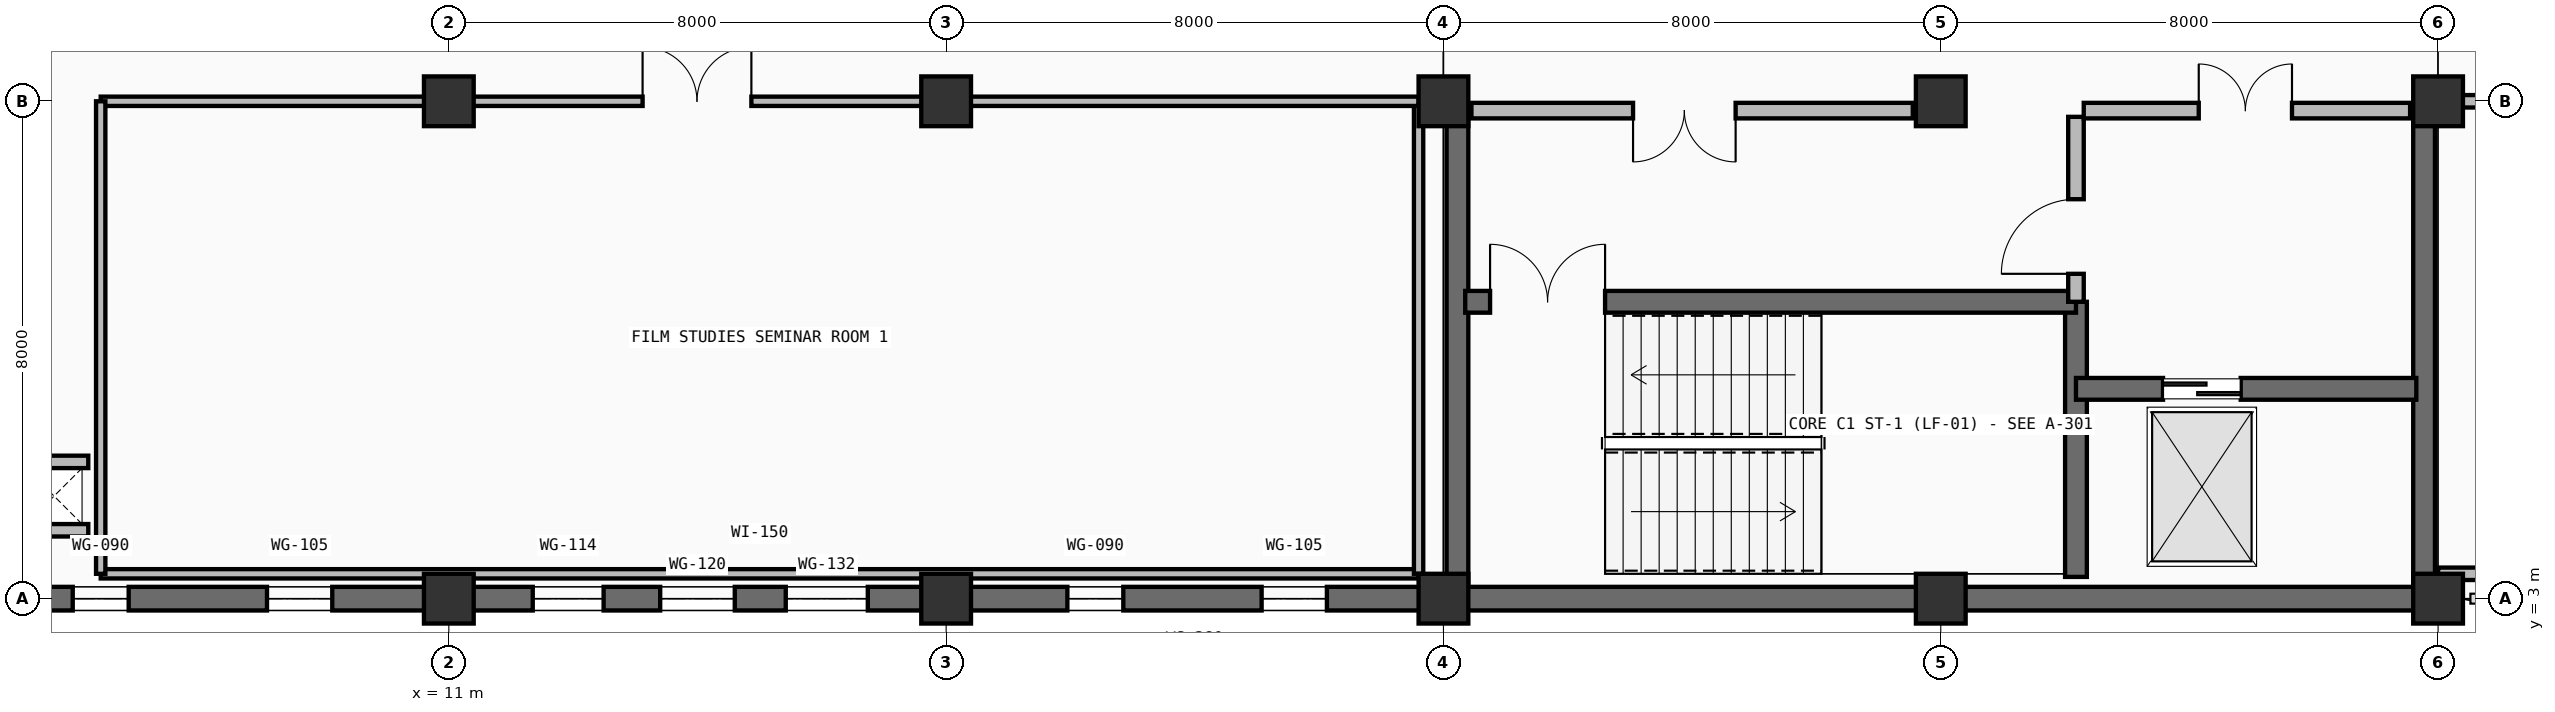
"""IFC4 building model, lengths in metres.
Left out: names, types, materials, properties, quantities, classifications, styles, units other than length and angle.
Written with IfcOpenShell. Run it as: python <this file> out.ifc"""

import sys

from ifc_helpers import new_model, si_unit, direction, frame, frame_2d, origin, origin_2d, place, context, subcontext, project, spatial, rectangle, extrude, element, fill, save


model = new_model("IFC4")
c1 = context("Model", 3, precision=1e-05, world=origin(), true_north=direction((0.0, 1.0)))
c2 = subcontext(c1, "Body", "Model", "MODEL_VIEW")
j1 = project(units=[si_unit("LENGTHUNIT", "METRE"), si_unit("PLANEANGLEUNIT", "RADIAN")], contexts=[c1])
p1 = place(None, origin())
s1 = spatial("IfcSite", under=j1, at=p1, CompositionType="ELEMENT")
p2 = place(p1, origin())
s2 = spatial("IfcBuilding", under=s1, at=p2, CompositionType="ELEMENT")
p3 = place(p2, frame((0.0, 0.0, 14.4)))
s3 = spatial("IfcBuildingStorey", under=s2, at=p3, CompositionType="ELEMENT", Elevation=14.4)
for number, where, z_axis, x_axis in (
    (1, (11.0, 3.0, 0.0), (0.0, 0.0, 1.0), (1.0, 0.0, 0.0)),
    (2, (11.0, 11.0, 0.0), (0.0, 0.0, 1.0), (1.0, 0.0, 0.0)),
    (3, (19.0, 3.0, 0.0), (0.0, 0.0, 1.0), (1.0, 0.0, 0.0)),
    (4, (19.0, 11.0, 0.0), (0.0, 0.0, 1.0), (1.0, 0.0, 0.0)),
    (5, (27.0, 3.0, 0.0), (0.0, 0.0, 1.0), (1.0, 0.0, 0.0)),
    (6, (27.0, 11.0, 0.0), (0.0, 0.0, 1.0), (1.0, 0.0, 0.0)),
    (7, (35.0, 3.0, 0.0), (0.0, 0.0, 1.0), (1.0, 0.0, 0.0)),
    (8, (35.0, 11.0, 0.0), (0.0, 0.0, 1.0), (1.0, 0.0, 0.0)),
    (9, (43.0, 3.0, 0.0), (0.0, 0.0, 1.0), (1.0, 0.0, 0.0)),
    (10, (43.0, 11.0, 0.0), (0.0, 0.0, 1.0), (1.0, 0.0, 0.0)),
):
    element("IfcColumn", number, at=place(p3, frame(where, z_axis=z_axis, x_axis=x_axis)), inside=s3, PredefinedType="COLUMN", context=c2, shape_type="SweptSolid", body=[
        extrude(rectangle(XDim=0.8, YDim=0.8, at=origin_2d()), origin(), (0.0, 0.0, 1.0), 4.5),
    ])
for number, where, z_axis, x_axis in (
    (11, (43.0, 3.0, 0.0), (0.0, 0.0, 1.0), (-1.0, 0.0, 0.0)),
    (12, (35.0, 3.0, 0.0), (0.0, 0.0, 1.0), (-1.0, 0.0, 0.0)),
):
    element("IfcWall", number, at=place(p3, frame(where, z_axis=z_axis, x_axis=x_axis)), inside=s3, PredefinedType="SOLIDWALL", context=c2, shape_type="SweptSolid", body=[
        extrude(rectangle(XDim=8.0, YDim=0.38, at=frame_2d((4.0, 0.0))), origin(), (0.0, 0.0, 1.0), 4.5),
    ])
p4 = place(p3, frame((27.0, 3.0, 0.0), z_axis=(0.0, 0.0, 1.0), x_axis=(-1.0, 0.0, 0.0)))
e13 = element("IfcWall", 13, at=p4, inside=s3, PredefinedType="SOLIDWALL", context=c2, shape_type="SweptSolid", body=[
    extrude(rectangle(XDim=8.0, YDim=0.38, at=frame_2d((4.0, 0.0))), origin(), (0.0, 0.0, 1.0), 4.5),
])
p5 = place(p4, frame((1.875, 0.0, 1.05)))
e14 = element("IfcOpeningElement", 14, at=p5, cuts=e13, PredefinedType="OPENING", context=c2, shape_type="SweptSolid", body=[
    extrude(rectangle(XDim=1.05, YDim=1.7, at=frame_2d((0.525, 0.85))), frame((0.0, 0.2, 0.0), z_axis=(0.0, -1.0, 0.0), x_axis=(1.0, 0.0, 0.0)), (0.0, 0.0, 1.0), 0.4),
])
p6 = place(p4, frame((5.15, 0.0, 1.05)))
e15 = element("IfcOpeningElement", 15, at=p6, cuts=e13, PredefinedType="OPENING", context=c2, shape_type="SweptSolid", body=[
    extrude(rectangle(XDim=0.9, YDim=1.5, at=frame_2d((0.45, 0.75))), frame((0.0, 0.2, 0.0), z_axis=(0.0, -1.0, 0.0), x_axis=(1.0, 0.0, 0.0)), (0.0, 0.0, 1.0), 0.4),
])
p7 = place(p3, frame((19.0, 3.0, 0.0), z_axis=(0.0, 0.0, 1.0), x_axis=(-1.0, 0.0, 0.0)))
e16 = element("IfcWall", 16, at=p7, inside=s3, PredefinedType="SOLIDWALL", context=c2, shape_type="SweptSolid", body=[
    extrude(rectangle(XDim=8.0, YDim=0.38, at=frame_2d((4.0, 0.0))), origin(), (0.0, 0.0, 1.0), 4.5),
])
p8 = place(p7, frame((1.26, 0.0, 1.05)))
e17 = element("IfcOpeningElement", 17, at=p8, cuts=e16, PredefinedType="OPENING", context=c2, shape_type="SweptSolid", body=[
    extrude(rectangle(XDim=1.32, YDim=2.05, at=frame_2d((0.66, 1.025))), frame((0.0, 0.2, 0.0), z_axis=(0.0, -1.0, 0.0), x_axis=(1.0, 0.0, 0.0)), (0.0, 0.0, 1.0), 0.4),
])
p9 = place(p7, frame((3.4, 0.0, 1.05)))
e18 = element("IfcOpeningElement", 18, at=p9, cuts=e16, PredefinedType="OPENING", context=c2, shape_type="SweptSolid", body=[
    extrude(rectangle(XDim=1.2, YDim=1.9, at=frame_2d((0.6, 0.95))), frame((0.0, 0.2, 0.0), z_axis=(0.0, -1.0, 0.0), x_axis=(1.0, 0.0, 0.0)), (0.0, 0.0, 1.0), 0.4),
])
p10 = place(p7, frame((5.51, 0.0, 1.05)))
e19 = element("IfcOpeningElement", 19, at=p10, cuts=e16, PredefinedType="OPENING", context=c2, shape_type="SweptSolid", body=[
    extrude(rectangle(XDim=1.14, YDim=1.8, at=frame_2d((0.57, 0.9))), frame((0.0, 0.2, 0.0), z_axis=(0.0, -1.0, 0.0), x_axis=(1.0, 0.0, 0.0)), (0.0, 0.0, 1.0), 0.4),
])
p11 = place(p3, frame((11.0, 3.0, 0.0), z_axis=(0.0, 0.0, 1.0), x_axis=(-1.0, 0.0, 0.0)))
e20 = element("IfcWall", 20, at=p11, inside=s3, PredefinedType="SOLIDWALL", context=c2, shape_type="SweptSolid", body=[
    extrude(rectangle(XDim=8.0, YDim=0.38, at=frame_2d((4.0, 0.0))), origin(), (0.0, 0.0, 1.0), 4.5),
])
p12 = place(p11, frame((1.875, 0.0, 1.05)))
e21 = element("IfcOpeningElement", 21, at=p12, cuts=e20, PredefinedType="OPENING", context=c2, shape_type="SweptSolid", body=[
    extrude(rectangle(XDim=1.05, YDim=1.7, at=frame_2d((0.525, 0.85))), frame((0.0, 0.2, 0.0), z_axis=(0.0, -1.0, 0.0), x_axis=(1.0, 0.0, 0.0)), (0.0, 0.0, 1.0), 0.4),
])
p13 = place(p11, frame((5.15, 0.0, 1.05)))
e22 = element("IfcOpeningElement", 22, at=p13, cuts=e20, PredefinedType="OPENING", context=c2, shape_type="SweptSolid", body=[
    extrude(rectangle(XDim=0.9, YDim=1.5, at=frame_2d((0.45, 0.75))), frame((0.0, 0.2, 0.0), z_axis=(0.0, -1.0, 0.0), x_axis=(1.0, 0.0, 0.0)), (0.0, 0.0, 1.0), 0.4),
])
p14 = place(p3, frame((27.225, 3.2, 0.0), z_axis=(0.0, 0.0, 1.0), x_axis=(0.0, 1.0, 0.0)))
e23 = element("IfcWall", 23, at=p14, inside=s3, PredefinedType="SHEAR", context=c2, shape_type="SweptSolid", body=[
    extrude(rectangle(XDim=7.6, YDim=0.35, at=frame_2d((3.8, 0.0))), origin(), (0.0, 0.0, 1.0), 4.2),
])
p15 = place(p3, frame((37.175, 3.35, 0.0), z_axis=(0.0, 0.0, 1.0), x_axis=(0.0, 1.0, 0.0)))
e24 = element("IfcWall", 24, at=p15, inside=s3, PredefinedType="SHEAR", context=c2, shape_type="SweptSolid", body=[
    extrude(rectangle(XDim=4.425, YDim=0.35, at=frame_2d((2.212, 0.0))), origin(), (0.0, 0.0, 1.0), 4.2),
])
p16 = place(p3, frame((42.775, 3.2, 0.0), z_axis=(0.0, 0.0, 1.0), x_axis=(0.0, 1.0, 0.0)))
e25 = element("IfcWall", 25, at=p16, inside=s3, PredefinedType="SHEAR", context=c2, shape_type="SweptSolid", body=[
    extrude(rectangle(XDim=7.6, YDim=0.35, at=frame_2d((3.8, 0.0))), origin(), (0.0, 0.0, 1.0), 4.2),
])
p17 = place(p3, frame((27.35, 7.775, 0.0), z_axis=(0.0, 0.0, 1.0), x_axis=(1.0, 0.0, 0.0)))
e26 = element("IfcWall", 26, at=p17, inside=s3, PredefinedType="SHEAR", context=c2, shape_type="SweptSolid", body=[
    extrude(rectangle(XDim=9.825, YDim=0.35, at=frame_2d((4.913, 0.0))), origin(), (0.0, 0.0, 1.0), 4.2),
])
p18 = place(p17, frame((0.4, 0.0, 0.0)))
e27 = element("IfcOpeningElement", 27, at=p18, cuts=e26, PredefinedType="OPENING", context=c2, shape_type="SweptSolid", body=[
    extrude(rectangle(XDim=1.85, YDim=2.25, at=frame_2d((0.925, 1.125))), frame((0.0, 0.185, 0.0), z_axis=(0.0, -1.0, 0.0), x_axis=(1.0, 0.0, 0.0)), (0.0, 0.0, 1.0), 0.37),
])
p19 = place(p3, frame((37.175, 6.375, 0.0), z_axis=(0.0, 0.0, 1.0), x_axis=(1.0, 0.0, 0.0)))
e28 = element("IfcWall", 28, at=p19, inside=s3, PredefinedType="SHEAR", context=c2, shape_type="SweptSolid", body=[
    extrude(rectangle(XDim=5.475, YDim=0.35, at=frame_2d((2.737, 0.0))), origin(), (0.0, 0.0, 1.0), 4.2),
])
p20 = place(p19, frame((1.4, 0.0, 0.0)))
e29 = element("IfcOpeningElement", 29, at=p20, cuts=e28, PredefinedType="OPENING", context=c2, shape_type="SweptSolid", body=[
    extrude(rectangle(XDim=1.25, YDim=2.25, at=frame_2d((0.625, 1.125))), frame((0.0, 0.185, 0.0), z_axis=(0.0, -1.0, 0.0), x_axis=(1.0, 0.0, 0.0)), (0.0, 0.0, 1.0), 0.37),
])
p21 = place(p3, frame((37.175, 7.775, 0.0), z_axis=(0.0, 0.0, 1.0), x_axis=(0.0, 1.0, 0.0)))
e30 = element("IfcWall", 30, at=p21, inside=s3, PredefinedType="PARTITIONING", context=c2, shape_type="SweptSolid", body=[
    extrude(rectangle(XDim=2.975, YDim=0.25, at=frame_2d((1.488, 0.0))), origin(), (0.0, 0.0, 1.0), 4.2),
])
p22 = place(p21, frame((0.45, 0.0, 0.0)))
e31 = element("IfcOpeningElement", 31, at=p22, cuts=e30, PredefinedType="OPENING", context=c2, shape_type="SweptSolid", body=[
    extrude(rectangle(XDim=1.2, YDim=2.2, at=frame_2d((0.6, 1.1))), frame((0.0, 0.135, 0.0), z_axis=(0.0, -1.0, 0.0), x_axis=(1.0, 0.0, 0.0)), (0.0, 0.0, 1.0), 0.27),
])
p23 = place(p3, frame((27.45, 10.85, 0.0), z_axis=(0.0, 0.0, 1.0), x_axis=(1.0, 0.0, 0.0)))
e32 = element("IfcWall", 32, at=p23, inside=s3, PredefinedType="PARTITIONING", context=c2, shape_type="SweptSolid", body=[
    extrude(rectangle(XDim=7.1, YDim=0.25, at=frame_2d((3.55, 0.0))), origin(), (0.0, 0.0, 1.0), 3.535),
])
p24 = place(p23, frame((2.6, 0.0, 0.0)))
e33 = element("IfcOpeningElement", 33, at=p24, cuts=e32, PredefinedType="OPENING", context=c2, shape_type="SweptSolid", body=[
    extrude(rectangle(XDim=1.65, YDim=2.25, at=frame_2d((0.825, 1.125))), frame((0.0, 0.135, 0.0), z_axis=(0.0, -1.0, 0.0), x_axis=(1.0, 0.0, 0.0)), (0.0, 0.0, 1.0), 0.27),
])
p25 = place(p3, frame((37.3, 10.85, 0.0), z_axis=(0.0, 0.0, 1.0), x_axis=(1.0, 0.0, 0.0)))
e34 = element("IfcWall", 34, at=p25, inside=s3, PredefinedType="PARTITIONING", context=c2, shape_type="SweptSolid", body=[
    extrude(rectangle(XDim=5.25, YDim=0.25, at=frame_2d((2.625, 0.0))), origin(), (0.0, 0.0, 1.0), 3.535),
])
p26 = place(p25, frame((1.85, 0.0, 0.0)))
e35 = element("IfcOpeningElement", 35, at=p26, cuts=e34, PredefinedType="OPENING", context=c2, shape_type="SweptSolid", body=[
    extrude(rectangle(XDim=1.5, YDim=2.2, at=frame_2d((0.75, 1.1))), frame((0.0, 0.135, 0.0), z_axis=(0.0, -1.0, 0.0), x_axis=(1.0, 0.0, 0.0)), (0.0, 0.0, 1.0), 0.27),
])
p27 = place(p3, frame((5.4, 3.4, 0.0), z_axis=(0.0, 0.0, 1.0), x_axis=(1.0, 0.0, 0.0)))
e36 = element("IfcWall", 36, at=p27, inside=s3, PredefinedType="PARTITIONING", context=c2, shape_type="SweptSolid", body=[
    extrude(rectangle(XDim=21.2, YDim=0.15, at=frame_2d((10.6, 0.0))), origin(), (0.0, 0.0, 1.0), 3.605),
])
p28 = place(p3, frame((26.6, 3.4, 0.0), z_axis=(0.0, 0.0, 1.0), x_axis=(0.0, 1.0, 0.0)))
e37 = element("IfcWall", 37, at=p28, inside=s3, PredefinedType="PARTITIONING", context=c2, shape_type="SweptSolid", body=[
    extrude(rectangle(XDim=7.6, YDim=0.15, at=frame_2d((3.8, 0.0))), origin(), (0.0, 0.0, 1.0), 3.585),
])
p29 = place(p3, frame((5.4, 11.0, 0.0), z_axis=(0.0, 0.0, 1.0), x_axis=(1.0, 0.0, 0.0)))
e38 = element("IfcWall", 38, at=p29, inside=s3, PredefinedType="PARTITIONING", context=c2, shape_type="SweptSolid", body=[
    extrude(rectangle(XDim=21.2, YDim=0.15, at=frame_2d((10.6, 0.0))), origin(), (0.0, 0.0, 1.0), 3.535),
])
p30 = place(p29, frame((8.717, 0.0, 0.0)))
e39 = element("IfcOpeningElement", 39, at=p30, cuts=e38, PredefinedType="OPENING", context=c2, shape_type="SweptSolid", body=[
    extrude(rectangle(XDim=1.75, YDim=2.3, at=frame_2d((0.875, 1.15))), frame((0.0, 0.085, 0.0), z_axis=(0.0, -1.0, 0.0), x_axis=(1.0, 0.0, 0.0)), (0.0, 0.0, 1.0), 0.17),
])
p31 = place(p3, frame((5.4, 3.4, 0.0), z_axis=(0.0, 0.0, 1.0), x_axis=(0.0, 1.0, 0.0)))
e40 = element("IfcWall", 40, at=p31, inside=s3, PredefinedType="PARTITIONING", context=c2, shape_type="SweptSolid", body=[
    extrude(rectangle(XDim=7.6, YDim=0.15, at=frame_2d((3.8, 0.0))), origin(), (0.0, 0.0, 1.0), 4.2),
])
p32 = place(p3, frame((43.0, 3.4, 0.0), z_axis=(0.0, 0.0, 1.0), x_axis=(1.0, 0.0, 0.0)))
e41 = element("IfcWall", 41, at=p32, inside=s3, PredefinedType="PARTITIONING", context=c2, shape_type="SweptSolid", body=[
    extrude(rectangle(XDim=19.0, YDim=0.2, at=frame_2d((9.5, 0.0))), origin(), (0.0, 0.0, 1.0), 3.605),
])
p33 = place(p3, frame((43.0, 11.0, 0.0), z_axis=(0.0, 0.0, 1.0), x_axis=(1.0, 0.0, 0.0)))
e42 = element("IfcWall", 42, at=p33, inside=s3, PredefinedType="PARTITIONING", context=c2, shape_type="SweptSolid", body=[
    extrude(rectangle(XDim=19.0, YDim=0.2, at=frame_2d((9.5, 0.0))), origin(), (0.0, 0.0, 1.0), 3.035),
])
p34 = place(p33, frame((11.365, 0.0, 0.0)))
e43 = element("IfcOpeningElement", 43, at=p34, cuts=e42, PredefinedType="OPENING", context=c2, shape_type="SweptSolid", body=[
    extrude(rectangle(XDim=1.3, YDim=2.2, at=frame_2d((0.65, 1.1))), frame((0.0, 0.11, 0.0), z_axis=(0.0, -1.0, 0.0), x_axis=(1.0, 0.0, 0.0)), (0.0, 0.0, 1.0), 0.22),
])
for number, where, z_axis, x_axis in (
    (44, (4.1, 4.1, 0.0), (0.0, 0.0, 1.0), (1.0, 0.0, 0.0)),
    (45, (4.1, 5.2, 0.0), (0.0, 0.0, 1.0), (1.0, 0.0, 0.0)),
):
    element("IfcWall", number, at=place(p3, frame(where, z_axis=z_axis, x_axis=x_axis)), inside=s3, PredefinedType="PARTITIONING", context=c2, shape_type="SweptSolid", body=[
        extrude(rectangle(XDim=1.1, YDim=0.2, at=frame_2d((0.55, 0.0))), origin(), (0.0, 0.0, 1.0), 4.2),
    ])
p35 = place(p5, origin())
e46 = element("IfcWindow", 46, at=p35, inside=s3, PartitioningType="SINGLE_PANEL", PredefinedType="WINDOW", context=c2, shape_type="SweptSolid", body=[
    extrude(rectangle(XDim=1.05, YDim=1.7, at=frame_2d((0.525, 0.85))), frame((0.0, 0.03, 0.0), z_axis=(0.0, -1.0, 0.0), x_axis=(1.0, 0.0, 0.0)), (0.0, 0.0, 1.0), 0.06),
])
fill(e14, e46)
p36 = place(p6, origin())
e47 = element("IfcWindow", 47, at=p36, inside=s3, PartitioningType="SINGLE_PANEL", PredefinedType="WINDOW", context=c2, shape_type="SweptSolid", body=[
    extrude(rectangle(XDim=0.9, YDim=1.5, at=frame_2d((0.45, 0.75))), frame((0.0, 0.03, 0.0), z_axis=(0.0, -1.0, 0.0), x_axis=(1.0, 0.0, 0.0)), (0.0, 0.0, 1.0), 0.06),
])
fill(e15, e47)
p37 = place(p8, origin())
e48 = element("IfcWindow", 48, at=p37, inside=s3, PartitioningType="SINGLE_PANEL", PredefinedType="WINDOW", context=c2, shape_type="SweptSolid", body=[
    extrude(rectangle(XDim=1.32, YDim=2.05, at=frame_2d((0.66, 1.025))), frame((0.0, 0.03, 0.0), z_axis=(0.0, -1.0, 0.0), x_axis=(1.0, 0.0, 0.0)), (0.0, 0.0, 1.0), 0.06),
])
fill(e17, e48)
p38 = place(p9, origin())
e49 = element("IfcWindow", 49, at=p38, inside=s3, PartitioningType="SINGLE_PANEL", PredefinedType="WINDOW", context=c2, shape_type="SweptSolid", body=[
    extrude(rectangle(XDim=1.2, YDim=1.9, at=frame_2d((0.6, 0.95))), frame((0.0, 0.03, 0.0), z_axis=(0.0, -1.0, 0.0), x_axis=(1.0, 0.0, 0.0)), (0.0, 0.0, 1.0), 0.06),
])
fill(e18, e49)
p39 = place(p10, origin())
e50 = element("IfcWindow", 50, at=p39, inside=s3, PartitioningType="SINGLE_PANEL", PredefinedType="WINDOW", context=c2, shape_type="SweptSolid", body=[
    extrude(rectangle(XDim=1.14, YDim=1.8, at=frame_2d((0.57, 0.9))), frame((0.0, 0.03, 0.0), z_axis=(0.0, -1.0, 0.0), x_axis=(1.0, 0.0, 0.0)), (0.0, 0.0, 1.0), 0.06),
])
fill(e19, e50)
p40 = place(p12, origin())
e51 = element("IfcWindow", 51, at=p40, inside=s3, PartitioningType="SINGLE_PANEL", PredefinedType="WINDOW", context=c2, shape_type="SweptSolid", body=[
    extrude(rectangle(XDim=1.05, YDim=1.7, at=frame_2d((0.525, 0.85))), frame((0.0, 0.03, 0.0), z_axis=(0.0, -1.0, 0.0), x_axis=(1.0, 0.0, 0.0)), (0.0, 0.0, 1.0), 0.06),
])
fill(e21, e51)
p41 = place(p13, origin())
e52 = element("IfcWindow", 52, at=p41, inside=s3, PartitioningType="SINGLE_PANEL", PredefinedType="WINDOW", context=c2, shape_type="SweptSolid", body=[
    extrude(rectangle(XDim=0.9, YDim=1.5, at=frame_2d((0.45, 0.75))), frame((0.0, 0.03, 0.0), z_axis=(0.0, -1.0, 0.0), x_axis=(1.0, 0.0, 0.0)), (0.0, 0.0, 1.0), 0.06),
])
fill(e22, e52)
p42 = place(p18, origin())
e53 = element("IfcDoor", 53, at=p42, inside=s3, OperationType="DOUBLE_DOOR_SINGLE_SWING", PredefinedType="DOOR", context=c2, shape_type="SweptSolid", body=[
    extrude(rectangle(XDim=1.85, YDim=2.25, at=frame_2d((0.925, 1.125))), frame((0.0, 0.025, 0.0), z_axis=(0.0, -1.0, 0.0), x_axis=(1.0, 0.0, 0.0)), (0.0, 0.0, 1.0), 0.05),
])
fill(e27, e53)
p43 = place(p20, origin())
e54 = element("IfcDoor", 54, at=p43, inside=s3, OperationType="DOUBLE_DOOR_SLIDING", PredefinedType="DOOR", context=c2, shape_type="SweptSolid", body=[
    extrude(rectangle(XDim=1.25, YDim=2.25, at=frame_2d((0.625, 1.125))), frame((0.0, 0.025, 0.0), z_axis=(0.0, -1.0, 0.0), x_axis=(1.0, 0.0, 0.0)), (0.0, 0.0, 1.0), 0.05),
])
fill(e29, e54)
p44 = place(p22, origin())
e55 = element("IfcDoor", 55, at=p44, inside=s3, OperationType="SINGLE_SWING_LEFT", PredefinedType="DOOR", context=c2, shape_type="SweptSolid", body=[
    extrude(rectangle(XDim=1.2, YDim=2.2, at=frame_2d((0.6, 1.1))), frame((0.0, 0.025, 0.0), z_axis=(0.0, -1.0, 0.0), x_axis=(1.0, 0.0, 0.0)), (0.0, 0.0, 1.0), 0.05),
])
fill(e31, e55)
p45 = place(p24, frame((1.65, 0.0, 0.0), z_axis=(0.0, 0.0, 1.0), x_axis=(-1.0, 0.0, 0.0)))
e56 = element("IfcDoor", 56, at=p45, inside=s3, OperationType="DOUBLE_DOOR_SINGLE_SWING", PredefinedType="DOOR", context=c2, shape_type="SweptSolid", body=[
    extrude(rectangle(XDim=1.65, YDim=2.25, at=frame_2d((0.825, 1.125))), frame((0.0, 0.025, 0.0), z_axis=(0.0, -1.0, 0.0), x_axis=(1.0, 0.0, 0.0)), (0.0, 0.0, 1.0), 0.05),
])
fill(e33, e56)
p46 = place(p26, origin())
e57 = element("IfcDoor", 57, at=p46, inside=s3, OperationType="DOUBLE_DOOR_SINGLE_SWING", PredefinedType="DOOR", context=c2, shape_type="SweptSolid", body=[
    extrude(rectangle(XDim=1.5, YDim=2.2, at=frame_2d((0.75, 1.1))), frame((0.0, 0.025, 0.0), z_axis=(0.0, -1.0, 0.0), x_axis=(1.0, 0.0, 0.0)), (0.0, 0.0, 1.0), 0.05),
])
fill(e35, e57)
p47 = place(p30, origin())
e58 = element("IfcDoor", 58, at=p47, inside=s3, OperationType="DOUBLE_DOOR_SINGLE_SWING", PredefinedType="DOOR", context=c2, shape_type="SweptSolid", body=[
    extrude(rectangle(XDim=1.75, YDim=2.3, at=frame_2d((0.875, 1.15))), frame((0.0, 0.025, 0.0), z_axis=(0.0, -1.0, 0.0), x_axis=(1.0, 0.0, 0.0)), (0.0, 0.0, 1.0), 0.05),
])
fill(e39, e58)
save(model, sys.argv[1])
